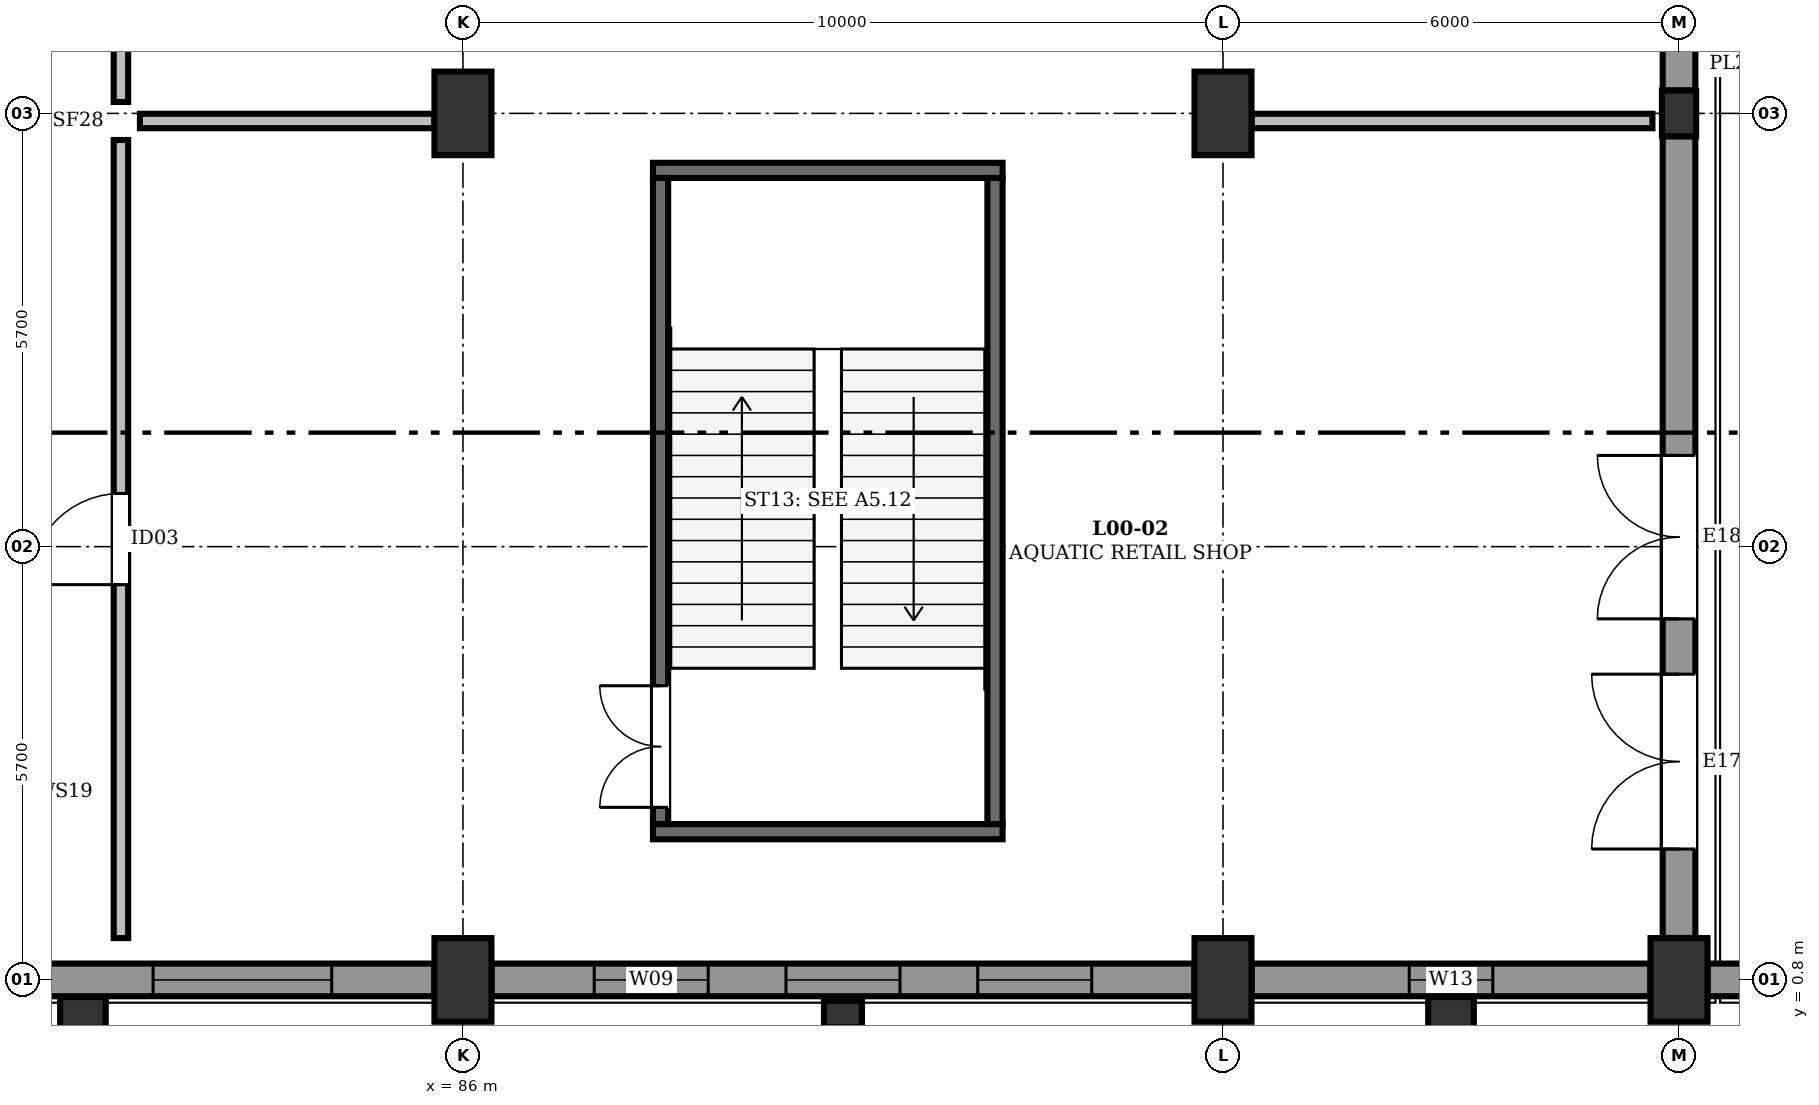
"""IFC4 building model, lengths in metres.
Left out: names, types, materials, properties, quantities, classifications, styles, units other than length and angle.
Written with IfcOpenShell. Run it as: python <this file> out.ifc"""

import sys

from ifc_helpers import new_model, si_unit, direction, frame, frame_2d, origin, origin_2d, place, context, subcontext, project, spatial, rectangle, extrude, element, fill, save


model = new_model("IFC4")
c1 = context("Model", 3, precision=1e-05, world=origin(), true_north=direction((0.0, 1.0)))
c2 = subcontext(c1, "Body", "Model", "MODEL_VIEW")
j1 = project(units=[si_unit("LENGTHUNIT", "METRE"), si_unit("PLANEANGLEUNIT", "RADIAN")], contexts=[c1])
p1 = place(None, origin())
s1 = spatial("IfcSite", under=j1, at=p1, CompositionType="ELEMENT")
p2 = place(p1, origin())
s2 = spatial("IfcBuilding", under=s1, at=p2, CompositionType="ELEMENT")
p3 = place(p2, origin())
s3 = spatial("IfcBuildingStorey", under=s2, at=p3, CompositionType="ELEMENT", Elevation=0.0)
for number, where, z_axis, x_axis in (
    (1, (86.0, 0.8, 0.0), (0.0, 0.0, 1.0), (1.0, 0.0, 0.0)),
    (2, (86.0, 12.2, 0.0), (0.0, 0.0, 1.0), (1.0, 0.0, 0.0)),
    (3, (96.0, 0.8, 0.0), (0.0, 0.0, 1.0), (1.0, 0.0, 0.0)),
    (4, (96.0, 12.2, 0.0), (0.0, 0.0, 1.0), (1.0, 0.0, 0.0)),
    (5, (102.0, 0.8, 0.0), (0.0, 0.0, 1.0), (1.0, 0.0, 0.0)),
):
    element("IfcColumn", number, at=place(p3, frame(where, z_axis=z_axis, x_axis=x_axis)), inside=s3, PredefinedType="COLUMN", context=c2, shape_type="SweptSolid", body=[
        extrude(rectangle(XDim=0.75, YDim=1.1, at=origin_2d()), origin(), (0.0, 0.0, 1.0), 5.4),
    ])
for number, where, z_axis, x_axis in (
    (6, (102.0, 12.2, 0.0), (0.0, 0.0, 1.0), (1.0, 0.0, 0.0)),
    (7, (81.0, 0.35, 0.0), (0.0, 0.0, 1.0), (0.0, 1.0, 0.0)),
):
    element("IfcColumn", number, at=place(p3, frame(where, z_axis=z_axis, x_axis=x_axis)), inside=s3, PredefinedType="PILASTER", context=c2, shape_type="SweptSolid", body=[
        extrude(rectangle(XDim=0.45, YDim=0.6, at=origin_2d()), origin(), (0.0, 0.0, 1.0), 5.4),
    ])
p4 = place(p3, frame((91.0, 0.35, 0.0), z_axis=(0.0, 0.0, 1.0), x_axis=(0.0, 1.0, 0.0)))
e8 = element("IfcColumn", 8, at=p4, inside=s3, PredefinedType="PILASTER", context=c2, shape_type="SweptSolid", body=[
    extrude(rectangle(XDim=0.35, YDim=0.5, at=origin_2d()), origin(), (0.0, 0.0, 1.0), 5.4),
])
p5 = place(p3, frame((99.0, 0.35, 0.0), z_axis=(0.0, 0.0, 1.0), x_axis=(0.0, 1.0, 0.0)))
e9 = element("IfcColumn", 9, at=p5, inside=s3, PredefinedType="PILASTER", context=c2, shape_type="SweptSolid", body=[
    extrude(rectangle(XDim=0.45, YDim=0.6, at=origin_2d()), origin(), (0.0, 0.0, 1.0), 5.4),
])
p6 = place(p3, frame((76.377, 0.8, 0.0), z_axis=(0.0, 0.0, 1.0), x_axis=(1.0, 0.0, 0.0)))
e10 = element("IfcWall", 10, at=p6, inside=s3, PredefinedType="STANDARD", context=c2, shape_type="SweptSolid", body=[
    extrude(rectangle(XDim=9.246, YDim=0.43, at=frame_2d((4.623, 0.0))), origin(), (0.0, 0.0, 1.0), 4.612),
])
p7 = place(p6, frame((1.35, 0.0, 0.75)))
e11 = element("IfcOpeningElement", 11, at=p7, cuts=e10, PredefinedType="OPENING", context=c2, shape_type="SweptSolid", body=[
    extrude(rectangle(XDim=2.35, YDim=1.75, at=frame_2d((1.175, 0.875))), frame((0.0, 0.227, 0.0), z_axis=(0.0, -1.0, 0.0), x_axis=(1.0, 0.0, 0.0)), (0.0, 0.0, 1.0), 0.454),
])
p8 = place(p6, frame((5.546, 0.0, 0.75)))
e12 = element("IfcOpeningElement", 12, at=p8, cuts=e10, PredefinedType="OPENING", context=c2, shape_type="SweptSolid", body=[
    extrude(rectangle(XDim=2.35, YDim=1.75, at=frame_2d((1.175, 0.875))), frame((0.0, 0.227, 0.0), z_axis=(0.0, -1.0, 0.0), x_axis=(1.0, 0.0, 0.0)), (0.0, 0.0, 1.0), 0.454),
])
p9 = place(p3, frame((86.377, 0.8, 0.0), z_axis=(0.0, 0.0, 1.0), x_axis=(1.0, 0.0, 0.0)))
e13 = element("IfcWall", 13, at=p9, inside=s3, PredefinedType="STANDARD", context=c2, shape_type="SweptSolid", body=[
    extrude(rectangle(XDim=9.246, YDim=0.43, at=frame_2d((4.623, 0.0))), origin(), (0.0, 0.0, 1.0), 4.612),
])
p10 = place(p9, frame((1.35, 0.0, 0.75)))
e14 = element("IfcOpeningElement", 14, at=p10, cuts=e13, PredefinedType="OPENING", context=c2, shape_type="SweptSolid", body=[
    extrude(rectangle(XDim=1.5, YDim=2.05, at=frame_2d((0.75, 1.025))), frame((0.0, 0.227, 0.0), z_axis=(0.0, -1.0, 0.0), x_axis=(1.0, 0.0, 0.0)), (0.0, 0.0, 1.0), 0.454),
])
p11 = place(p9, frame((3.873, 0.0, 0.75)))
e15 = element("IfcOpeningElement", 15, at=p11, cuts=e13, PredefinedType="OPENING", context=c2, shape_type="SweptSolid", body=[
    extrude(rectangle(XDim=1.5, YDim=2.05, at=frame_2d((0.75, 1.025))), frame((0.0, 0.227, 0.0), z_axis=(0.0, -1.0, 0.0), x_axis=(1.0, 0.0, 0.0)), (0.0, 0.0, 1.0), 0.454),
])
p12 = place(p9, frame((6.396, 0.0, 0.75)))
e16 = element("IfcOpeningElement", 16, at=p12, cuts=e13, PredefinedType="OPENING", context=c2, shape_type="SweptSolid", body=[
    extrude(rectangle(XDim=1.5, YDim=2.05, at=frame_2d((0.75, 1.025))), frame((0.0, 0.227, 0.0), z_axis=(0.0, -1.0, 0.0), x_axis=(1.0, 0.0, 0.0)), (0.0, 0.0, 1.0), 0.454),
])
p13 = place(p3, frame((96.377, 0.8, 0.0), z_axis=(0.0, 0.0, 1.0), x_axis=(1.0, 0.0, 0.0)))
e17 = element("IfcWall", 17, at=p13, inside=s3, PredefinedType="STANDARD", context=c2, shape_type="SweptSolid", body=[
    extrude(rectangle(XDim=5.246, YDim=0.43, at=frame_2d((2.623, 0.0))), origin(), (0.0, 0.0, 1.0), 4.612),
])
p14 = place(p13, frame((2.073, 0.0, 0.75)))
e18 = element("IfcOpeningElement", 18, at=p14, cuts=e17, PredefinedType="OPENING", context=c2, shape_type="SweptSolid", body=[
    extrude(rectangle(XDim=1.1, YDim=1.25, at=frame_2d((0.55, 0.625))), frame((0.0, 0.227, 0.0), z_axis=(0.0, -1.0, 0.0), x_axis=(1.0, 0.0, 0.0)), (0.0, 0.0, 1.0), 0.454),
])
p15 = place(p3, frame((102.377, 0.8, 0.0), z_axis=(0.0, 0.0, 1.0), x_axis=(1.0, 0.0, 0.0)))
e19 = element("IfcWall", 19, at=p15, inside=s3, PredefinedType="STANDARD", context=c2, shape_type="SweptSolid", body=[
    extrude(rectangle(XDim=7.996, YDim=0.43, at=frame_2d((3.998, 0.0))), origin(), (0.0, 0.0, 1.0), 5.1),
])
p16 = place(p15, frame((1.35, 0.0, 0.75)))
e20 = element("IfcOpeningElement", 20, at=p16, cuts=e19, PredefinedType="OPENING", context=c2, shape_type="SweptSolid", body=[
    extrude(rectangle(XDim=1.2, YDim=2.05, at=frame_2d((0.6, 1.025))), frame((0.0, 0.227, 0.0), z_axis=(0.0, -1.0, 0.0), x_axis=(1.0, 0.0, 0.0)), (0.0, 0.0, 1.0), 0.454),
])
p17 = place(p15, frame((3.398, 0.0, 0.75)))
e21 = element("IfcOpeningElement", 21, at=p17, cuts=e19, PredefinedType="OPENING", context=c2, shape_type="SweptSolid", body=[
    extrude(rectangle(XDim=1.2, YDim=2.05, at=frame_2d((0.6, 1.025))), frame((0.0, 0.227, 0.0), z_axis=(0.0, -1.0, 0.0), x_axis=(1.0, 0.0, 0.0)), (0.0, 0.0, 1.0), 0.454),
])
p18 = place(p15, frame((5.446, 0.0, 0.75)))
e22 = element("IfcOpeningElement", 22, at=p18, cuts=e19, PredefinedType="OPENING", context=c2, shape_type="SweptSolid", body=[
    extrude(rectangle(XDim=1.2, YDim=2.05, at=frame_2d((0.6, 1.025))), frame((0.0, 0.227, 0.0), z_axis=(0.0, -1.0, 0.0), x_axis=(1.0, 0.0, 0.0)), (0.0, 0.0, 1.0), 0.454),
])
p19 = place(p3, frame((102.0, 1.352, 0.0), z_axis=(0.0, 0.0, 1.0), x_axis=(0.0, 1.0, 0.0)))
e23 = element("IfcWall", 23, at=p19, inside=s3, PredefinedType="STANDARD", context=c2, shape_type="SweptSolid", body=[
    extrude(rectangle(XDim=10.546, YDim=0.43, at=frame_2d((5.273, 0.0))), origin(), (0.0, 0.0, 1.0), 4.245),
])
p20 = place(p19, frame((1.17, 0.0, 0.0)))
e24 = element("IfcOpeningElement", 24, at=p20, cuts=e23, PredefinedType="OPENING", context=c2, shape_type="SweptSolid", body=[
    extrude(rectangle(XDim=2.3, YDim=2.4, at=frame_2d((1.15, 1.2))), frame((0.0, 0.227, 0.0), z_axis=(0.0, -1.0, 0.0), x_axis=(1.0, 0.0, 0.0)), (0.0, 0.0, 1.0), 0.454),
])
p21 = place(p19, frame((4.198, 0.0, 0.0)))
e25 = element("IfcOpeningElement", 25, at=p21, cuts=e23, PredefinedType="OPENING", context=c2, shape_type="SweptSolid", body=[
    extrude(rectangle(XDim=2.15, YDim=2.4, at=frame_2d((1.075, 1.2))), frame((0.0, 0.227, 0.0), z_axis=(0.0, -1.0, 0.0), x_axis=(1.0, 0.0, 0.0)), (0.0, 0.0, 1.0), 0.454),
])
p22 = place(p3, frame((102.0, 12.502, 0.0), z_axis=(0.0, 0.0, 1.0), x_axis=(0.0, 1.0, 0.0)))
e26 = element("IfcWall", 26, at=p22, inside=s3, PredefinedType="STANDARD", context=c2, shape_type="SweptSolid", body=[
    extrude(rectangle(XDim=10.846, YDim=0.43, at=frame_2d((5.423, 0.0))), origin(), (0.0, 0.0, 1.0), 4.245),
])
p23 = place(p22, frame((1.386, 0.0, 0.0)))
e27 = element("IfcOpeningElement", 27, at=p23, cuts=e26, PredefinedType="OPENING", context=c2, shape_type="SweptSolid", body=[
    extrude(rectangle(XDim=2.0, YDim=2.35, at=frame_2d((1.0, 1.175))), frame((0.0, 0.227, 0.0), z_axis=(0.0, -1.0, 0.0), x_axis=(1.0, 0.0, 0.0)), (0.0, 0.0, 1.0), 0.454),
])
p24 = place(p22, frame((4.473, 0.0, 0.0)))
e28 = element("IfcOpeningElement", 28, at=p24, cuts=e26, PredefinedType="OPENING", context=c2, shape_type="SweptSolid", body=[
    extrude(rectangle(XDim=1.9, YDim=2.3, at=frame_2d((0.95, 1.15))), frame((0.0, 0.227, 0.0), z_axis=(0.0, -1.0, 0.0), x_axis=(1.0, 0.0, 0.0)), (0.0, 0.0, 1.0), 0.454),
])
for number, where, z_axis, x_axis in (
    (29, (88.5, 2.75, 0.0), (0.0, 0.0, 1.0), (1.0, 0.0, 0.0)),
    (30, (88.5, 11.45, 0.0), (0.0, 0.0, 1.0), (1.0, 0.0, 0.0)),
):
    element("IfcWall", number, at=place(p3, frame(where, z_axis=z_axis, x_axis=x_axis)), inside=s3, PredefinedType="SOLIDWALL", context=c2, shape_type="SweptSolid", body=[
        extrude(rectangle(XDim=4.6, YDim=0.2, at=frame_2d((2.3, 0.0))), origin(), (0.0, 0.0, 1.0), 5.16),
    ])
p25 = place(p3, frame((88.6, 2.85, 0.0), z_axis=(0.0, 0.0, 1.0), x_axis=(0.0, 1.0, 0.0)))
e31 = element("IfcWall", 31, at=p25, inside=s3, PredefinedType="SOLIDWALL", context=c2, shape_type="SweptSolid", body=[
    extrude(rectangle(XDim=8.5, YDim=0.2, at=frame_2d((4.25, 0.0))), origin(), (0.0, 0.0, 1.0), 5.16),
])
p26 = place(p25, frame((0.22, 0.0, 0.0)))
e32 = element("IfcOpeningElement", 32, at=p26, cuts=e31, PredefinedType="OPENING", context=c2, shape_type="SweptSolid", body=[
    extrude(rectangle(XDim=1.6, YDim=2.2, at=frame_2d((0.8, 1.1))), frame((0.0, 0.112, 0.0), z_axis=(0.0, -1.0, 0.0), x_axis=(1.0, 0.0, 0.0)), (0.0, 0.0, 1.0), 0.224),
])
p27 = place(p3, frame((93.0, 2.85, 0.0), z_axis=(0.0, 0.0, 1.0), x_axis=(0.0, 1.0, 0.0)))
e33 = element("IfcWall", 33, at=p27, inside=s3, PredefinedType="SOLIDWALL", context=c2, shape_type="SweptSolid", body=[
    extrude(rectangle(XDim=8.5, YDim=0.2, at=frame_2d((4.25, 0.0))), origin(), (0.0, 0.0, 1.0), 5.16),
])
p28 = place(p3, frame((81.5, 1.35, 0.0), z_axis=(0.0, 0.0, 1.0), x_axis=(0.0, 1.0, 0.0)))
e34 = element("IfcWall", 34, at=p28, inside=s3, PredefinedType="SOLIDWALL", context=c2, shape_type="SweptSolid", body=[
    extrude(rectangle(XDim=10.5, YDim=0.19, at=frame_2d((5.25, 0.0))), origin(), (0.0, 0.0, 1.0), 4.245),
])
p29 = place(p28, frame((4.65, 0.0, 0.0)))
e35 = element("IfcOpeningElement", 35, at=p29, cuts=e34, PredefinedType="OPENING", context=c2, shape_type="SweptSolid", body=[
    extrude(rectangle(XDim=1.2, YDim=2.15, at=frame_2d((0.6, 1.075))), frame((0.0, 0.107, 0.0), z_axis=(0.0, -1.0, 0.0), x_axis=(1.0, 0.0, 0.0)), (0.0, 0.0, 1.0), 0.214),
])
p30 = place(p3, frame((81.5, 12.35, 0.0), z_axis=(0.0, 0.0, 1.0), x_axis=(0.0, 1.0, 0.0)))
e36 = element("IfcWall", 36, at=p30, inside=s3, PredefinedType="SOLIDWALL", context=c2, shape_type="SweptSolid", body=[
    extrude(rectangle(XDim=5.7, YDim=0.19, at=frame_2d((2.85, 0.0))), origin(), (0.0, 0.0, 1.0), 4.245),
])
p31 = place(p30, frame((2.325, 0.0, 0.0)))
e37 = element("IfcOpeningElement", 37, at=p31, cuts=e36, PredefinedType="OPENING", context=c2, shape_type="SweptSolid", body=[
    extrude(rectangle(XDim=1.05, YDim=2.15, at=frame_2d((0.525, 1.075))), frame((0.0, 0.107, 0.0), z_axis=(0.0, -1.0, 0.0), x_axis=(1.0, 0.0, 0.0)), (0.0, 0.0, 1.0), 0.214),
])
p32 = place(p3, frame((81.75, 12.1, 0.0), z_axis=(0.0, 0.0, 1.0), x_axis=(1.0, 0.0, 0.0)))
e38 = element("IfcWall", 38, at=p32, inside=s3, PredefinedType="SOLIDWALL", context=c2, shape_type="SweptSolid", body=[
    extrude(rectangle(XDim=3.873, YDim=0.19, at=frame_2d((1.937, 0.0))), origin(), (0.0, 0.0, 1.0), 4.245),
])
p33 = place(p3, frame((96.377, 12.1, 0.0), z_axis=(0.0, 0.0, 1.0), x_axis=(1.0, 0.0, 0.0)))
e39 = element("IfcWall", 39, at=p33, inside=s3, PredefinedType="SOLIDWALL", context=c2, shape_type="SweptSolid", body=[
    extrude(rectangle(XDim=5.273, YDim=0.19, at=frame_2d((2.636, 0.0))), origin(), (0.0, 0.0, 1.0), 4.245),
])
p34 = place(p8, origin())
e40 = element("IfcWindow", 40, at=p34, inside=s3, PartitioningType="TRIPLE_PANEL_VERTICAL", PredefinedType="WINDOW", context=c2, shape_type="SweptSolid", body=[
    extrude(rectangle(XDim=2.35, YDim=1.75, at=frame_2d((1.175, 0.875))), frame((0.0, 0.08, 0.0), z_axis=(0.0, -1.0, 0.0), x_axis=(1.0, 0.0, 0.0)), (0.0, 0.0, 1.0), 0.06),
])
fill(e12, e40)
p35 = place(p10, origin())
e41 = element("IfcWindow", 41, at=p35, inside=s3, PartitioningType="DOUBLE_PANEL_VERTICAL", PredefinedType="WINDOW", context=c2, shape_type="SweptSolid", body=[
    extrude(rectangle(XDim=1.5, YDim=2.05, at=frame_2d((0.75, 1.025))), frame((0.0, 0.08, 0.0), z_axis=(0.0, -1.0, 0.0), x_axis=(1.0, 0.0, 0.0)), (0.0, 0.0, 1.0), 0.06),
])
fill(e14, e41)
p36 = place(p11, origin())
e42 = element("IfcWindow", 42, at=p36, inside=s3, PartitioningType="DOUBLE_PANEL_VERTICAL", PredefinedType="WINDOW", context=c2, shape_type="SweptSolid", body=[
    extrude(rectangle(XDim=1.5, YDim=2.05, at=frame_2d((0.75, 1.025))), frame((0.0, 0.08, 0.0), z_axis=(0.0, -1.0, 0.0), x_axis=(1.0, 0.0, 0.0)), (0.0, 0.0, 1.0), 0.06),
])
fill(e15, e42)
p37 = place(p12, origin())
e43 = element("IfcWindow", 43, at=p37, inside=s3, PartitioningType="DOUBLE_PANEL_VERTICAL", PredefinedType="WINDOW", context=c2, shape_type="SweptSolid", body=[
    extrude(rectangle(XDim=1.5, YDim=2.05, at=frame_2d((0.75, 1.025))), frame((0.0, 0.08, 0.0), z_axis=(0.0, -1.0, 0.0), x_axis=(1.0, 0.0, 0.0)), (0.0, 0.0, 1.0), 0.06),
])
fill(e16, e43)
p38 = place(p14, origin())
e44 = element("IfcWindow", 44, at=p38, inside=s3, PartitioningType="SINGLE_PANEL", PredefinedType="WINDOW", context=c2, shape_type="SweptSolid", body=[
    extrude(rectangle(XDim=1.1, YDim=1.25, at=frame_2d((0.55, 0.625))), frame((0.0, 0.08, 0.0), z_axis=(0.0, -1.0, 0.0), x_axis=(1.0, 0.0, 0.0)), (0.0, 0.0, 1.0), 0.06),
])
fill(e18, e44)
p39 = place(p20, origin())
e45 = element("IfcDoor", 45, at=p39, inside=s3, OperationType="DOUBLE_DOOR_SINGLE_SWING", PredefinedType="DOOR", context=c2, shape_type="SweptSolid", body=[
    extrude(rectangle(XDim=2.3, YDim=2.4, at=frame_2d((1.15, 1.2))), frame((0.0, 0.025, 0.0), z_axis=(0.0, -1.0, 0.0), x_axis=(1.0, 0.0, 0.0)), (0.0, 0.0, 1.0), 0.05),
])
fill(e24, e45)
p40 = place(p21, origin())
e46 = element("IfcDoor", 46, at=p40, inside=s3, OperationType="DOUBLE_DOOR_SINGLE_SWING", PredefinedType="DOOR", context=c2, shape_type="SweptSolid", body=[
    extrude(rectangle(XDim=2.15, YDim=2.4, at=frame_2d((1.075, 1.2))), frame((0.0, 0.025, 0.0), z_axis=(0.0, -1.0, 0.0), x_axis=(1.0, 0.0, 0.0)), (0.0, 0.0, 1.0), 0.05),
])
fill(e25, e46)
p41 = place(p26, origin())
e47 = element("IfcDoor", 47, at=p41, inside=s3, OperationType="DOUBLE_DOOR_SINGLE_SWING", PredefinedType="DOOR", context=c2, shape_type="SweptSolid", body=[
    extrude(rectangle(XDim=1.6, YDim=2.2, at=frame_2d((0.8, 1.1))), frame((0.0, 0.025, 0.0), z_axis=(0.0, -1.0, 0.0), x_axis=(1.0, 0.0, 0.0)), (0.0, 0.0, 1.0), 0.05),
])
fill(e32, e47)
p42 = place(p29, origin())
e48 = element("IfcDoor", 48, at=p42, inside=s3, OperationType="SINGLE_SWING_LEFT", PredefinedType="DOOR", context=c2, shape_type="SweptSolid", body=[
    extrude(rectangle(XDim=1.2, YDim=2.15, at=frame_2d((0.6, 1.075))), frame((0.0, 0.025, 0.0), z_axis=(0.0, -1.0, 0.0), x_axis=(1.0, 0.0, 0.0)), (0.0, 0.0, 1.0), 0.05),
])
fill(e35, e48)
save(model, sys.argv[1])
